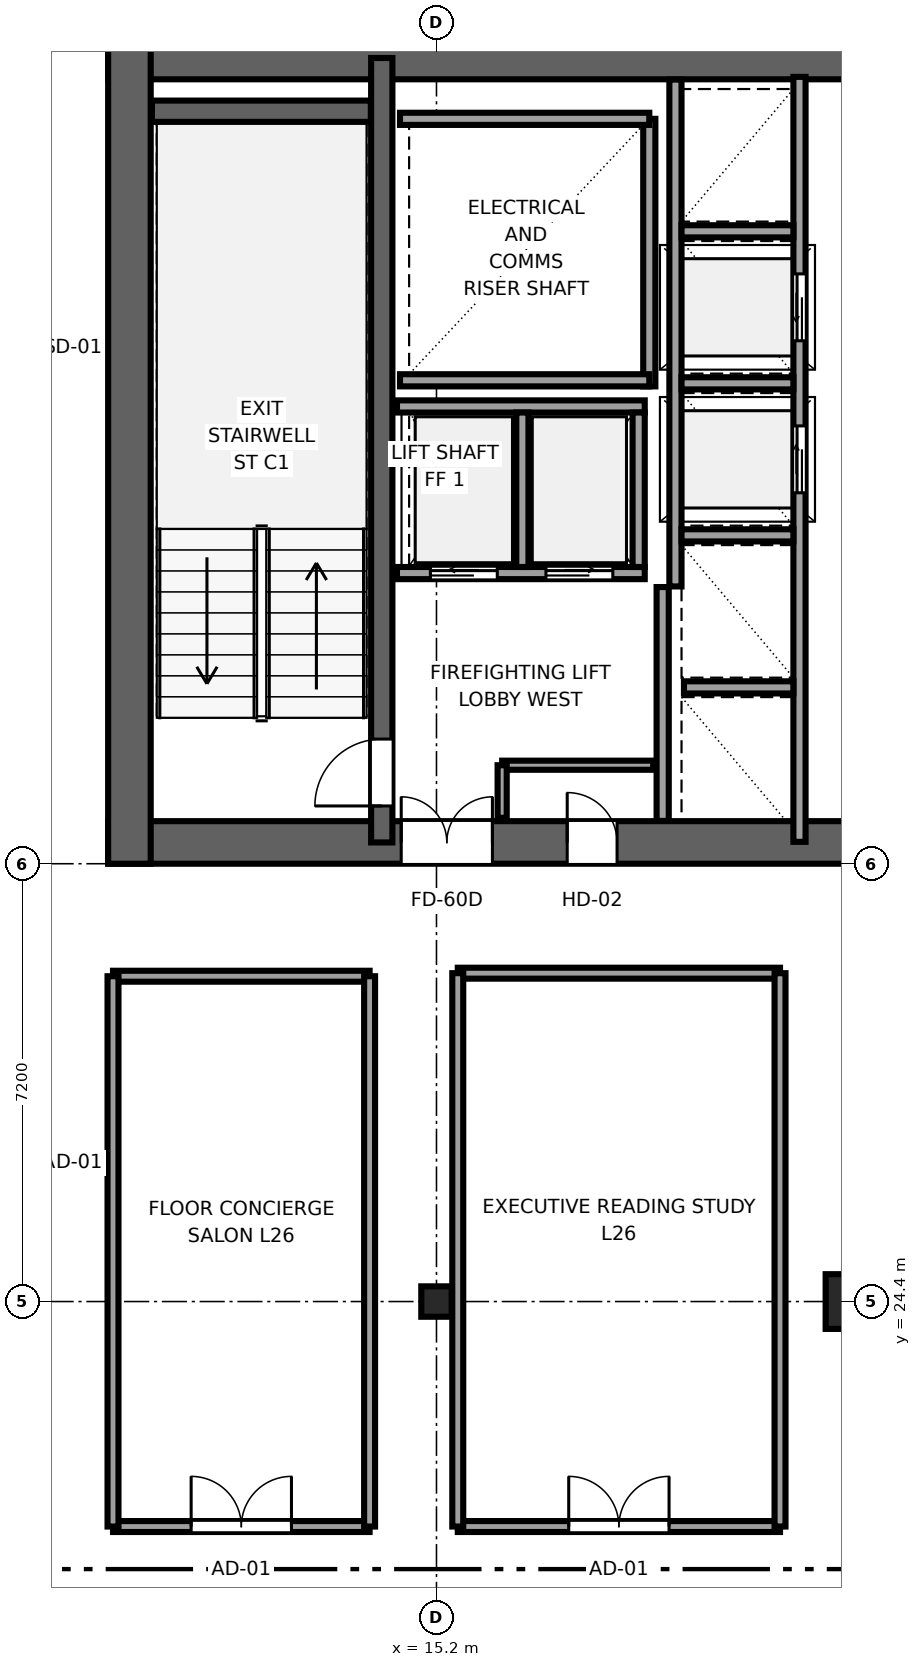
"""IFC4 building model, lengths in metres.
Left out: names, types, materials, properties, quantities, classifications, styles, units other than length and angle.
Written with IfcOpenShell. Run it as: python <this file> out.ifc"""

import sys

from ifc_helpers import new_model, si_unit, direction, frame, frame_2d, origin, origin_2d, place, context, subcontext, project, spatial, rectangle, i_section, extrude, source, transform, mapped, element, fill, save


model = new_model("IFC4")
c1 = context("Model", 3, precision=1e-05, world=origin(), true_north=direction((0.0, 1.0)))
c2 = subcontext(c1, "Body", "Model", "MODEL_VIEW")
j1 = project(units=[si_unit("LENGTHUNIT", "METRE"), si_unit("PLANEANGLEUNIT", "RADIAN")], contexts=[c1])
p1 = place(None, origin())
s1 = spatial("IfcSite", under=j1, at=p1, CompositionType="ELEMENT")
p2 = place(p1, origin())
s2 = spatial("IfcBuilding", under=s1, at=p2, CompositionType="ELEMENT")
p3 = place(p2, frame((0.0, 0.0, 104.45)))
s3 = spatial("IfcBuildingStorey", under=s2, at=p3, CompositionType="ELEMENT", Elevation=104.45)
p4 = place(p3, frame((9.8, 31.95, 0.0), z_axis=(0.0, 0.0, 1.0), x_axis=(1.0, 0.0, 0.0)))
e1 = element("IfcWall", 1, at=p4, inside=s3, PredefinedType="SHEAR", context=c2, shape_type="SweptSolid", body=[
    extrude(rectangle(XDim=26.4, YDim=0.7, at=frame_2d((13.2, 0.0))), origin(), (0.0, 0.0, 1.0), 3.55),
])
p5 = place(p4, frame((6.32, 0.0, 0.0), z_axis=(0.0, 0.0, 1.0), x_axis=(-1.0, 0.0, 0.0)))
e2 = element("IfcOpeningElement", 2, at=p5, cuts=e1, PredefinedType="OPENING", context=c2, shape_type="SweptSolid", body=[
    extrude(rectangle(XDim=1.5, YDim=2.04, at=frame_2d((0.75, 1.02))), frame((0.0, 0.36, 0.0), z_axis=(0.0, -1.0, 0.0), x_axis=(1.0, 0.0, 0.0)), (0.0, 0.0, 1.0), 0.72),
])
p6 = place(p4, frame((13.95, 0.0, 0.0), z_axis=(0.0, 0.0, 1.0), x_axis=(-1.0, 0.0, 0.0)))
e3 = element("IfcOpeningElement", 3, at=p6, cuts=e1, PredefinedType="OPENING", context=c2, shape_type="SweptSolid", body=[
    extrude(rectangle(XDim=1.5, YDim=2.04, at=frame_2d((0.75, 1.02))), frame((0.0, 0.36, 0.0), z_axis=(0.0, -1.0, 0.0), x_axis=(1.0, 0.0, 0.0)), (0.0, 0.0, 1.0), 0.72),
])
p7 = place(p4, frame((21.58, 0.0, 0.0), z_axis=(0.0, 0.0, 1.0), x_axis=(-1.0, 0.0, 0.0)))
e4 = element("IfcOpeningElement", 4, at=p7, cuts=e1, PredefinedType="OPENING", context=c2, shape_type="SweptSolid", body=[
    extrude(rectangle(XDim=1.5, YDim=2.04, at=frame_2d((0.75, 1.02))), frame((0.0, 0.36, 0.0), z_axis=(0.0, -1.0, 0.0), x_axis=(1.0, 0.0, 0.0)), (0.0, 0.0, 1.0), 0.72),
])
p8 = place(p4, frame((8.37, 0.0, 0.0), z_axis=(0.0, 0.0, 1.0), x_axis=(-1.0, 0.0, 0.0)))
e5 = element("IfcOpeningElement", 5, at=p8, cuts=e1, PredefinedType="OPENING", context=c2, shape_type="SweptSolid", body=[
    extrude(rectangle(XDim=0.82, YDim=2.01, at=frame_2d((0.41, 1.005))), frame((0.0, 0.36, 0.0), z_axis=(0.0, -1.0, 0.0), x_axis=(1.0, 0.0, 0.0)), (0.0, 0.0, 1.0), 0.72),
])
p9 = place(p4, frame((18.87, 0.0, 0.0), z_axis=(0.0, 0.0, 1.0), x_axis=(-1.0, 0.0, 0.0)))
e6 = element("IfcOpeningElement", 6, at=p9, cuts=e1, PredefinedType="OPENING", context=c2, shape_type="SweptSolid", body=[
    extrude(rectangle(XDim=0.82, YDim=2.01, at=frame_2d((0.41, 1.005))), frame((0.0, 0.36, 0.0), z_axis=(0.0, -1.0, 0.0), x_axis=(1.0, 0.0, 0.0)), (0.0, 0.0, 1.0), 0.72),
])
p10 = place(p3, frame((9.8, 44.85, 0.0), z_axis=(0.0, 0.0, 1.0), x_axis=(1.0, 0.0, 0.0)))
e7 = element("IfcWall", 7, at=p10, inside=s3, PredefinedType="SHEAR", context=c2, shape_type="SweptSolid", body=[
    extrude(rectangle(XDim=26.4, YDim=0.7, at=frame_2d((13.2, 0.0))), origin(), (0.0, 0.0, 1.0), 3.55),
])
p11 = place(p3, frame((10.15, 31.6, 0.0), z_axis=(0.0, 0.0, 1.0), x_axis=(0.0, 1.0, 0.0)))
e8 = element("IfcWall", 8, at=p11, inside=s3, PredefinedType="SHEAR", context=c2, shape_type="SweptSolid", body=[
    extrude(rectangle(XDim=13.6, YDim=0.7, at=frame_2d((6.8, 0.0))), origin(), (0.0, 0.0, 1.0), 3.55),
])
p12 = place(p3, frame((14.3, 31.95, 0.0), z_axis=(0.0, 0.0, 1.0), x_axis=(0.0, 1.0, 0.0)))
e9 = element("IfcWall", 9, at=p12, inside=s3, PredefinedType="SHEAR", context=c2, shape_type="SweptSolid", body=[
    extrude(rectangle(XDim=12.9, YDim=0.35, at=frame_2d((6.45, 0.0))), origin(), (0.0, 0.0, 1.0), 3.55),
])
p13 = place(p12, frame((0.6, 0.0, 0.0)))
e10 = element("IfcOpeningElement", 10, at=p13, cuts=e9, PredefinedType="OPENING", context=c2, shape_type="SweptSolid", body=[
    extrude(rectangle(XDim=1.1, YDim=2.12, at=frame_2d((0.55, 1.06))), frame((0.0, 0.185, 0.0), z_axis=(0.0, -1.0, 0.0), x_axis=(1.0, 0.0, 0.0)), (0.0, 0.0, 1.0), 0.37),
])
p14 = place(p3, frame((10.52, 43.975, 0.0), z_axis=(0.0, 0.0, 1.0), x_axis=(1.0, 0.0, 0.0)))
e11 = element("IfcWall", 11, at=p14, inside=s3, PredefinedType="SHEAR", context=c2, shape_type="SweptSolid", body=[
    extrude(rectangle(XDim=3.6, YDim=0.35, at=frame_2d((1.8, 0.0))), origin(), (0.0, 0.0, 1.0), 3.55),
])
m1 = source(origin(), c2, "Body", "SweptSolid", [
    extrude(i_section(OverallWidth=0.5, OverallDepth=0.5, WebThickness=0.022, FlangeThickness=0.034, at=origin_2d()), origin(), (0.0, 0.0, 1.0), 3.55),
])
p15 = place(p3, frame((15.2, 24.4, 0.0), z_axis=(0.0, 0.0, 1.0), x_axis=(1.0, 0.0, 0.0)))
e12 = element("IfcColumn", 12, at=p15, inside=s3, PredefinedType="COLUMN", context=c2, shape_type="MappedRepresentation", body=[
    mapped(m1, transform((0.0, 0.0, 0.0), x_axis=(1.0, 0.0, 0.0), y_axis=(0.0, 1.0, 0.0), z_axis=(0.0, 0.0, 1.0), scale=1.0)),
])
m2 = source(origin(), c2, "Body", "SweptSolid", [
    extrude(rectangle(XDim=0.9, YDim=0.9, at=origin_2d()), origin(), (0.0, 0.0, 1.0), 3.55),
])
p16 = place(p3, frame((22.05, 24.4, 0.0), z_axis=(0.0, 0.0, 1.0), x_axis=(1.0, 0.0, 0.0)))
e13 = element("IfcColumn", 13, at=p16, inside=s3, PredefinedType="COLUMN", context=c2, shape_type="MappedRepresentation", body=[
    mapped(m2, transform((0.0, 0.0, 0.0), x_axis=(1.0, 0.0, 0.0), y_axis=(0.0, 1.0, 0.0), z_axis=(0.0, 0.0, 1.0), scale=1.0)),
])
p17 = place(p3, frame((18.7, 39.45, 0.0), z_axis=(0.0, 0.0, 1.0), x_axis=(0.0, 1.0, 0.0)))
e14 = element("IfcWall", 14, at=p17, inside=s3, PredefinedType="SOLIDWALL", context=c2, shape_type="SweptSolid", body=[
    extrude(rectangle(XDim=4.4, YDim=0.2, at=frame_2d((2.2, 0.0))), origin(), (0.0, 0.0, 1.0), 3.37),
])
for number, where, z_axis, x_axis in (
    (15, (14.6, 39.55, 0.0), (0.0, 0.0, 1.0), (1.0, 0.0, 0.0)),
    (16, (14.6, 43.85, 0.0), (0.0, 0.0, 1.0), (1.0, 0.0, 0.0)),
):
    element("IfcWall", number, at=place(p3, frame(where, z_axis=z_axis, x_axis=x_axis)), inside=s3, PredefinedType="SOLIDWALL", context=c2, shape_type="SweptSolid", body=[
        extrude(rectangle(XDim=4.1, YDim=0.2, at=frame_2d((2.05, 0.0))), origin(), (0.0, 0.0, 1.0), 3.37),
    ])
p18 = place(p3, frame((18.92, 32.304, 0.0), z_axis=(0.0, 0.0, 1.0), x_axis=(0.0, 1.0, 0.0)))
e17 = element("IfcWall", 17, at=p18, inside=s3, PredefinedType="SOLIDWALL", context=c2, shape_type="SweptSolid", body=[
    extrude(rectangle(XDim=3.846, YDim=0.2, at=frame_2d((1.923, 0.0))), origin(), (0.0, 0.0, 1.0), 3.37),
])
p19 = place(p3, frame((21.17, 31.96, 0.0), z_axis=(0.0, 0.0, 1.0), x_axis=(0.0, 1.0, 0.0)))
e18 = element("IfcWall", 18, at=p19, inside=s3, PredefinedType="SOLIDWALL", context=c2, shape_type="SweptSolid", body=[
    extrude(rectangle(XDim=12.58, YDim=0.2, at=frame_2d((6.29, 0.0))), origin(), (0.0, 0.0, 1.0), 3.37),
])
p20 = place(p19, frame((5.74, 0.0, 0.0)))
e19 = element("IfcOpeningElement", 19, at=p20, cuts=e18, PredefinedType="OPENING", context=c2, shape_type="SweptSolid", body=[
    extrude(rectangle(XDim=1.1, YDim=2.12, at=frame_2d((0.55, 1.06))), frame((0.0, 0.11, 0.0), z_axis=(0.0, -1.0, 0.0), x_axis=(1.0, 0.0, 0.0)), (0.0, 0.0, 1.0), 0.22),
])
p21 = place(p19, frame((8.24, 0.0, 0.0)))
e20 = element("IfcOpeningElement", 20, at=p21, cuts=e18, PredefinedType="OPENING", context=c2, shape_type="SweptSolid", body=[
    extrude(rectangle(XDim=1.1, YDim=2.12, at=frame_2d((0.55, 1.06))), frame((0.0, 0.11, 0.0), z_axis=(0.0, -1.0, 0.0), x_axis=(1.0, 0.0, 0.0)), (0.0, 0.0, 1.0), 0.22),
])
p22 = place(p3, frame((19.13, 36.16, 0.0), z_axis=(0.0, 0.0, 1.0), x_axis=(0.0, 1.0, 0.0)))
e21 = element("IfcWall", 21, at=p22, inside=s3, PredefinedType="SOLIDWALL", context=c2, shape_type="SweptSolid", body=[
    extrude(rectangle(XDim=8.336, YDim=0.2, at=frame_2d((4.168, 0.0))), origin(), (0.0, 0.0, 1.0), 3.37),
])
p23 = place(p3, frame((19.27, 34.5, 0.0), z_axis=(0.0, 0.0, 1.0), x_axis=(1.0, 0.0, 0.0)))
e22 = element("IfcWall", 22, at=p23, inside=s3, PredefinedType="SOLIDWALL", context=c2, shape_type="SweptSolid", body=[
    extrude(rectangle(XDim=1.8, YDim=0.2, at=frame_2d((0.9, 0.0))), origin(), (0.0, 0.0, 1.0), 3.37),
])
for number, where, z_axis, x_axis in (
    (23, (19.23, 37.0, 0.0), (0.0, 0.0, 1.0), (1.0, 0.0, 0.0)),
    (24, (19.23, 39.5, 0.0), (0.0, 0.0, 1.0), (1.0, 0.0, 0.0)),
    (25, (19.23, 42.0, 0.0), (0.0, 0.0, 1.0), (1.0, 0.0, 0.0)),
):
    element("IfcWall", number, at=place(p3, frame(where, z_axis=z_axis, x_axis=x_axis)), inside=s3, PredefinedType="SOLIDWALL", context=c2, shape_type="SweptSolid", body=[
        extrude(rectangle(XDim=1.84, YDim=0.2, at=frame_2d((0.92, 0.0))), origin(), (0.0, 0.0, 1.0), 3.37),
    ])
p24 = place(p3, frame((14.55, 36.38, 0.0), z_axis=(0.0, 0.0, 1.0), x_axis=(1.0, 0.0, 0.0)))
e26 = element("IfcWall", 26, at=p24, inside=s3, PredefinedType="SOLIDWALL", context=c2, shape_type="SweptSolid", body=[
    extrude(rectangle(XDim=4.075, YDim=0.2, at=frame_2d((2.038, 0.0))), origin(), (0.0, 0.0, 1.0), 3.37),
])
p25 = place(p24, frame((0.55, 0.0, 0.0)))
e27 = element("IfcOpeningElement", 27, at=p25, cuts=e26, PredefinedType="OPENING", context=c2, shape_type="SweptSolid", body=[
    extrude(rectangle(XDim=1.1, YDim=2.12, at=frame_2d((0.55, 1.06))), frame((0.0, 0.11, 0.0), z_axis=(0.0, -1.0, 0.0), x_axis=(1.0, 0.0, 0.0)), (0.0, 0.0, 1.0), 0.22),
])
p26 = place(p24, frame((2.45, 0.0, 0.0)))
e28 = element("IfcOpeningElement", 28, at=p26, cuts=e26, PredefinedType="OPENING", context=c2, shape_type="SweptSolid", body=[
    extrude(rectangle(XDim=1.1, YDim=2.12, at=frame_2d((0.55, 1.06))), frame((0.0, 0.11, 0.0), z_axis=(0.0, -1.0, 0.0), x_axis=(1.0, 0.0, 0.0)), (0.0, 0.0, 1.0), 0.22),
])
p27 = place(p3, frame((14.55, 39.12, 0.0), z_axis=(0.0, 0.0, 1.0), x_axis=(1.0, 0.0, 0.0)))
e29 = element("IfcWall", 29, at=p27, inside=s3, PredefinedType="SOLIDWALL", context=c2, shape_type="SweptSolid", body=[
    extrude(rectangle(XDim=4.075, YDim=0.2, at=frame_2d((2.038, 0.0))), origin(), (0.0, 0.0, 1.0), 3.37),
])
for number, where, z_axis, x_axis in (
    (30, (18.525, 36.48, 0.0), (0.0, 0.0, 1.0), (0.0, 1.0, 0.0)),
    (31, (16.613, 36.48, 0.0), (0.0, 0.0, 1.0), (0.0, 1.0, 0.0)),
):
    element("IfcWall", number, at=place(p3, frame(where, z_axis=z_axis, x_axis=x_axis)), inside=s3, PredefinedType="SOLIDWALL", context=c2, shape_type="SweptSolid", body=[
        extrude(rectangle(XDim=2.54, YDim=0.2, at=frame_2d((1.27, 0.0))), origin(), (0.0, 0.0, 1.0), 3.37),
    ])
p28 = place(p3, frame((16.28, 33.22, 0.0), z_axis=(0.0, 0.0, 1.0), x_axis=(1.0, 0.0, 0.0)))
e32 = element("IfcWall", 32, at=p28, inside=s3, PredefinedType="PARTITIONING", context=c2, shape_type="SweptSolid", body=[
    extrude(rectangle(XDim=2.485, YDim=0.15, at=frame_2d((1.242, 0.0))), origin(), (0.0, 0.0, 1.0), 3.37),
])
p29 = place(p3, frame((16.28, 32.355, 0.0), z_axis=(0.0, 0.0, 1.0), x_axis=(0.0, 1.0, 0.0)))
e33 = element("IfcWall", 33, at=p29, inside=s3, PredefinedType="PARTITIONING", context=c2, shape_type="SweptSolid", body=[
    extrude(rectangle(XDim=0.865, YDim=0.15, at=frame_2d((0.433, 0.0))), origin(), (0.0, 0.0, 1.0), 3.37),
])
p30 = place(p3, frame((9.88, 20.7, 0.0), z_axis=(0.0, 0.0, 1.0), x_axis=(1.0, 0.0, 0.0)))
e34 = element("IfcWall", 34, at=p30, inside=s3, PredefinedType="PARTITIONING", context=c2, shape_type="SweptSolid", body=[
    extrude(rectangle(XDim=4.22, YDim=0.18, at=frame_2d((2.11, 0.0))), origin(), (0.0, 0.0, 1.0), 3.37),
])
p31 = place(p30, frame((1.285, 0.0, 0.0)))
e35 = element("IfcOpeningElement", 35, at=p31, cuts=e34, PredefinedType="OPENING", context=c2, shape_type="SweptSolid", body=[
    extrude(rectangle(XDim=1.65, YDim=2.15, at=frame_2d((0.825, 1.075))), frame((0.0, 0.1, 0.0), z_axis=(0.0, -1.0, 0.0), x_axis=(1.0, 0.0, 0.0)), (0.0, 0.0, 1.0), 0.2),
])
p32 = place(p3, frame((9.88, 29.75, 0.0), z_axis=(0.0, 0.0, 1.0), x_axis=(1.0, 0.0, 0.0)))
e36 = element("IfcWall", 36, at=p32, inside=s3, PredefinedType="PARTITIONING", context=c2, shape_type="SweptSolid", body=[
    extrude(rectangle(XDim=4.22, YDim=0.18, at=frame_2d((2.11, 0.0))), origin(), (0.0, 0.0, 1.0), 3.37),
])
for number, where, z_axis, x_axis in (
    (37, (9.88, 20.7, 0.0), (0.0, 0.0, 1.0), (0.0, 1.0, 0.0)),
    (38, (14.1, 20.7, 0.0), (0.0, 0.0, 1.0), (0.0, 1.0, 0.0)),
):
    element("IfcWall", number, at=place(p3, frame(where, z_axis=z_axis, x_axis=x_axis)), inside=s3, PredefinedType="PARTITIONING", context=c2, shape_type="SweptSolid", body=[
        extrude(rectangle(XDim=9.05, YDim=0.18, at=frame_2d((4.525, 0.0))), origin(), (0.0, 0.0, 1.0), 3.37),
    ])
p33 = place(p3, frame((15.55, 20.7, 0.0), z_axis=(0.0, 0.0, 1.0), x_axis=(1.0, 0.0, 0.0)))
e39 = element("IfcWall", 39, at=p33, inside=s3, PredefinedType="PARTITIONING", context=c2, shape_type="SweptSolid", body=[
    extrude(rectangle(XDim=5.3, YDim=0.18, at=frame_2d((2.65, 0.0))), origin(), (0.0, 0.0, 1.0), 3.37),
])
p34 = place(p33, frame((1.825, 0.0, 0.0)))
e40 = element("IfcOpeningElement", 40, at=p34, cuts=e39, PredefinedType="OPENING", context=c2, shape_type="SweptSolid", body=[
    extrude(rectangle(XDim=1.65, YDim=2.15, at=frame_2d((0.825, 1.075))), frame((0.0, 0.1, 0.0), z_axis=(0.0, -1.0, 0.0), x_axis=(1.0, 0.0, 0.0)), (0.0, 0.0, 1.0), 0.2),
])
p35 = place(p3, frame((15.55, 29.8, 0.0), z_axis=(0.0, 0.0, 1.0), x_axis=(1.0, 0.0, 0.0)))
e41 = element("IfcWall", 41, at=p35, inside=s3, PredefinedType="PARTITIONING", context=c2, shape_type="SweptSolid", body=[
    extrude(rectangle(XDim=5.3, YDim=0.18, at=frame_2d((2.65, 0.0))), origin(), (0.0, 0.0, 1.0), 3.37),
])
for number, where, z_axis, x_axis in (
    (42, (15.55, 20.7, 0.0), (0.0, 0.0, 1.0), (0.0, 1.0, 0.0)),
    (43, (20.85, 20.7, 0.0), (0.0, 0.0, 1.0), (0.0, 1.0, 0.0)),
):
    element("IfcWall", number, at=place(p3, frame(where, z_axis=z_axis, x_axis=x_axis)), inside=s3, PredefinedType="PARTITIONING", context=c2, shape_type="SweptSolid", body=[
        extrude(rectangle(XDim=9.1, YDim=0.18, at=frame_2d((4.55, 0.0))), origin(), (0.0, 0.0, 1.0), 3.37),
    ])
m3 = source(origin(), c2, "Body", "SweptSolid", [
    extrude(rectangle(XDim=1.1, YDim=2.12, at=frame_2d((0.55, 1.06))), frame((0.0, 0.025, 0.0), z_axis=(0.0, -1.0, 0.0), x_axis=(1.0, 0.0, 0.0)), (0.0, 0.0, 1.0), 0.05),
])
p36 = place(p13, origin())
e44 = element("IfcDoor", 44, at=p36, inside=s3, OperationType="SINGLE_SWING_LEFT", PredefinedType="DOOR", context=c2, shape_type="MappedRepresentation", body=[
    mapped(m3, transform((0.0, 0.0, 0.0), x_axis=(1.0, 0.0, 0.0), y_axis=(0.0, 1.0, 0.0), z_axis=(0.0, 0.0, 1.0), scale=1.0)),
])
fill(e10, e44)
m4 = source(origin(), c2, "Body", "SweptSolid", [
    extrude(rectangle(XDim=1.5, YDim=2.04, at=frame_2d((0.75, 1.02))), frame((0.0, 0.025, 0.0), z_axis=(0.0, -1.0, 0.0), x_axis=(1.0, 0.0, 0.0)), (0.0, 0.0, 1.0), 0.05),
])
p37 = place(p5, origin())
e45 = element("IfcDoor", 45, at=p37, inside=s3, OperationType="DOUBLE_DOOR_SINGLE_SWING", PredefinedType="DOOR", context=c2, shape_type="MappedRepresentation", body=[
    mapped(m4, transform((0.0, 0.0, 0.0), x_axis=(1.0, 0.0, 0.0), y_axis=(0.0, 1.0, 0.0), z_axis=(0.0, 0.0, 1.0), scale=1.0)),
])
fill(e2, e45)
m5 = source(origin(), c2, "Body", "SweptSolid", [
    extrude(rectangle(XDim=0.82, YDim=2.01, at=frame_2d((0.41, 1.005))), frame((0.0, 0.025, 0.0), z_axis=(0.0, -1.0, 0.0), x_axis=(1.0, 0.0, 0.0)), (0.0, 0.0, 1.0), 0.05),
])
p38 = place(p8, origin())
e46 = element("IfcDoor", 46, at=p38, inside=s3, OperationType="SINGLE_SWING_LEFT", PredefinedType="DOOR", context=c2, shape_type="MappedRepresentation", body=[
    mapped(m5, transform((0.0, 0.0, 0.0), x_axis=(1.0, 0.0, 0.0), y_axis=(0.0, 1.0, 0.0), z_axis=(0.0, 0.0, 1.0), scale=1.0)),
])
fill(e5, e46)
m6 = source(origin(), c2, "Body", "SweptSolid", [
    extrude(rectangle(XDim=1.1, YDim=2.12, at=frame_2d((0.55, 1.06))), frame((0.0, 0.025, 0.0), z_axis=(0.0, -1.0, 0.0), x_axis=(1.0, 0.0, 0.0)), (0.0, 0.0, 1.0), 0.05),
])
p39 = place(p20, origin())
e47 = element("IfcDoor", 47, at=p39, inside=s3, OperationType="SLIDING_TO_RIGHT", PredefinedType="DOOR", context=c2, shape_type="MappedRepresentation", body=[
    mapped(m6, transform((0.0, 0.0, 0.0), x_axis=(1.0, 0.0, 0.0), y_axis=(0.0, 1.0, 0.0), z_axis=(0.0, 0.0, 1.0), scale=1.0)),
])
fill(e19, e47)
p40 = place(p21, origin())
e48 = element("IfcDoor", 48, at=p40, inside=s3, OperationType="SLIDING_TO_LEFT", PredefinedType="DOOR", context=c2, shape_type="MappedRepresentation", body=[
    mapped(m6, transform((0.0, 0.0, 0.0), x_axis=(1.0, 0.0, 0.0), y_axis=(0.0, 1.0, 0.0), z_axis=(0.0, 0.0, 1.0), scale=1.0)),
])
fill(e20, e48)
p41 = place(p25, origin())
e49 = element("IfcDoor", 49, at=p41, inside=s3, OperationType="SLIDING_TO_LEFT", PredefinedType="DOOR", context=c2, shape_type="MappedRepresentation", body=[
    mapped(m6, transform((0.0, 0.0, 0.0), x_axis=(1.0, 0.0, 0.0), y_axis=(0.0, 1.0, 0.0), z_axis=(0.0, 0.0, 1.0), scale=1.0)),
])
fill(e27, e49)
p42 = place(p26, origin())
e50 = element("IfcDoor", 50, at=p42, inside=s3, OperationType="SLIDING_TO_RIGHT", PredefinedType="DOOR", context=c2, shape_type="MappedRepresentation", body=[
    mapped(m6, transform((0.0, 0.0, 0.0), x_axis=(1.0, 0.0, 0.0), y_axis=(0.0, 1.0, 0.0), z_axis=(0.0, 0.0, 1.0), scale=1.0)),
])
fill(e28, e50)
m7 = source(origin(), c2, "Body", "SweptSolid", [
    extrude(rectangle(XDim=1.65, YDim=2.15, at=frame_2d((0.825, 1.075))), frame((0.0, 0.025, 0.0), z_axis=(0.0, -1.0, 0.0), x_axis=(1.0, 0.0, 0.0)), (0.0, 0.0, 1.0), 0.05),
])
p43 = place(p31, origin())
e51 = element("IfcDoor", 51, at=p43, inside=s3, OperationType="DOUBLE_DOOR_SINGLE_SWING", PredefinedType="DOOR", context=c2, shape_type="MappedRepresentation", body=[
    mapped(m7, transform((0.0, 0.0, 0.0), x_axis=(1.0, 0.0, 0.0), y_axis=(0.0, 1.0, 0.0), z_axis=(0.0, 0.0, 1.0), scale=1.0)),
])
fill(e35, e51)
p44 = place(p34, origin())
e52 = element("IfcDoor", 52, at=p44, inside=s3, OperationType="DOUBLE_DOOR_SINGLE_SWING", PredefinedType="DOOR", context=c2, shape_type="MappedRepresentation", body=[
    mapped(m7, transform((0.0, 0.0, 0.0), x_axis=(1.0, 0.0, 0.0), y_axis=(0.0, 1.0, 0.0), z_axis=(0.0, 0.0, 1.0), scale=1.0)),
])
fill(e40, e52)
save(model, sys.argv[1])
